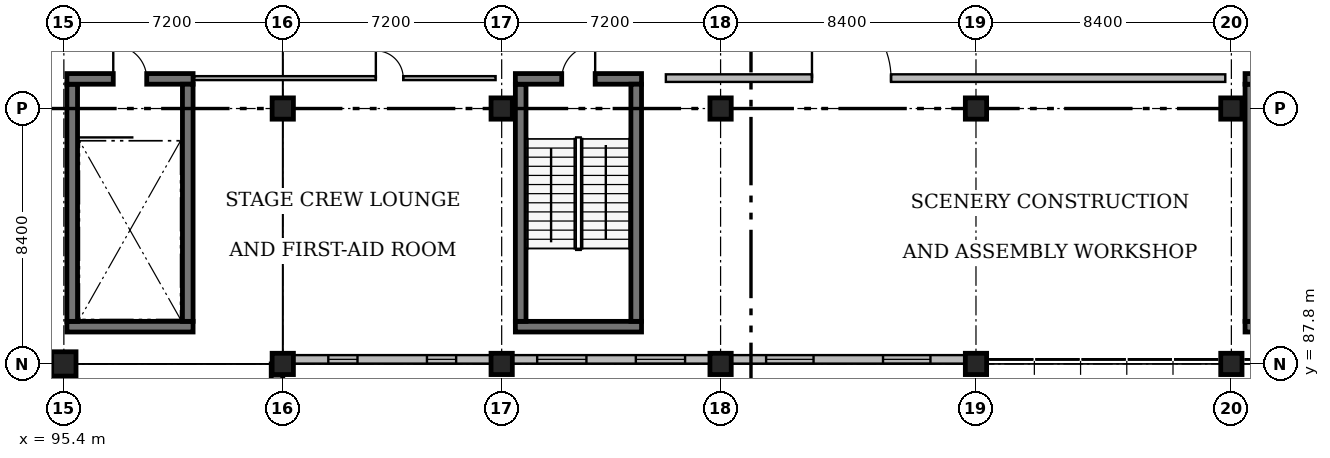
"""IFC4 building model, lengths in metres.
Left out: names, types, materials, properties, quantities, classifications, styles, units other than length and angle.
Written with IfcOpenShell. Run it as: python <this file> out.ifc"""

import sys

from ifc_helpers import new_model, si_unit, direction, frame, frame_2d, origin, origin_2d, place, context, subcontext, project, spatial, rectangle, extrude, element, fill, save


model = new_model("IFC4")
c1 = context("Model", 3, precision=1e-05, world=origin(), true_north=direction((0.0, 1.0)))
c2 = subcontext(c1, "Body", "Model", "MODEL_VIEW")
j1 = project(units=[si_unit("LENGTHUNIT", "METRE"), si_unit("PLANEANGLEUNIT", "RADIAN")], contexts=[c1])
p1 = place(None, origin())
s1 = spatial("IfcSite", under=j1, at=p1, CompositionType="ELEMENT")
p2 = place(p1, origin())
s2 = spatial("IfcBuilding", under=s1, at=p2, CompositionType="ELEMENT")
p3 = place(p2, origin())
s3 = spatial("IfcBuildingStorey", under=s2, at=p3, CompositionType="ELEMENT", Elevation=0.0)
p4 = place(p3, frame((95.4, 87.8, 0.0), z_axis=(0.0, 0.0, 1.0), x_axis=(1.0, 0.0, 0.0)))
e1 = element("IfcColumn", 1, at=p4, inside=s3, PredefinedType="COLUMN", context=c2, shape_type="SweptSolid", body=[
    extrude(rectangle(XDim=0.8, YDim=0.8, at=origin_2d()), origin(), (0.0, 0.0, 1.0), 4.8),
])
for number, where, z_axis, x_axis in (
    (2, (102.6, 87.8, 0.0), (0.0, 0.0, 1.0), (1.0, 0.0, 0.0)),
    (3, (102.6, 96.2, 0.0), (0.0, 0.0, 1.0), (1.0, 0.0, 0.0)),
    (4, (109.8, 87.8, 0.0), (0.0, 0.0, 1.0), (1.0, 0.0, 0.0)),
    (5, (109.8, 96.2, 0.0), (0.0, 0.0, 1.0), (1.0, 0.0, 0.0)),
    (6, (117.0, 87.8, 0.0), (0.0, 0.0, 1.0), (1.0, 0.0, 0.0)),
    (7, (117.0, 96.2, 0.0), (0.0, 0.0, 1.0), (1.0, 0.0, 0.0)),
    (8, (125.4, 87.8, 0.0), (0.0, 0.0, 1.0), (1.0, 0.0, 0.0)),
    (9, (125.4, 96.2, 0.0), (0.0, 0.0, 1.0), (1.0, 0.0, 0.0)),
    (10, (133.8, 87.8, 0.0), (0.0, 0.0, 1.0), (1.0, 0.0, 0.0)),
    (11, (133.8, 96.2, 0.0), (0.0, 0.0, 1.0), (1.0, 0.0, 0.0)),
):
    element("IfcColumn", number, at=place(p3, frame(where, z_axis=z_axis, x_axis=x_axis)), inside=s3, PredefinedType="COLUMN", context=c2, shape_type="SweptSolid", body=[
        extrude(rectangle(XDim=0.7, YDim=0.7, at=origin_2d()), origin(), (0.0, 0.0, 1.0), 4.8),
    ])
p5 = place(p3, frame((99.65, 89.025, 0.0), z_axis=(0.0, 0.0, 1.0), x_axis=(-1.0, 0.0, 0.0)))
e12 = element("IfcWall", 12, at=p5, inside=s3, PredefinedType="SOLIDWALL", context=c2, shape_type="SweptSolid", body=[
    extrude(rectangle(XDim=4.15, YDim=0.35, at=frame_2d((2.075, 0.0))), origin(), (0.0, 0.0, 1.0), 4.54),
])
p6 = place(p3, frame((95.675, 89.2, 0.0), z_axis=(0.0, 0.0, 1.0), x_axis=(0.0, 1.0, 0.0)))
e13 = element("IfcWall", 13, at=p6, inside=s3, PredefinedType="SOLIDWALL", context=c2, shape_type="SweptSolid", body=[
    extrude(rectangle(XDim=7.8, YDim=0.35, at=frame_2d((3.9, 0.0))), origin(), (0.0, 0.0, 1.0), 4.54),
])
p7 = place(p3, frame((95.5, 97.175, 0.0), z_axis=(0.0, 0.0, 1.0), x_axis=(1.0, 0.0, 0.0)))
e14 = element("IfcWall", 14, at=p7, inside=s3, PredefinedType="SOLIDWALL", context=c2, shape_type="SweptSolid", body=[
    extrude(rectangle(XDim=4.15, YDim=0.35, at=frame_2d((2.075, 0.0))), origin(), (0.0, 0.0, 1.0), 4.54),
])
p8 = place(p7, frame((1.525, 0.0, 0.0)))
e15 = element("IfcOpeningElement", 15, at=p8, cuts=e14, PredefinedType="OPENING", context=c2, shape_type="SweptSolid", body=[
    extrude(rectangle(XDim=1.1, YDim=2.15, at=frame_2d((0.55, 1.075))), frame((0.0, 0.195, 0.0), z_axis=(0.0, -1.0, 0.0), x_axis=(1.0, 0.0, 0.0)), (0.0, 0.0, 1.0), 0.39),
])
p9 = place(p3, frame((99.475, 97.0, 0.0), z_axis=(0.0, 0.0, 1.0), x_axis=(0.0, -1.0, 0.0)))
e16 = element("IfcWall", 16, at=p9, inside=s3, PredefinedType="SOLIDWALL", context=c2, shape_type="SweptSolid", body=[
    extrude(rectangle(XDim=7.8, YDim=0.35, at=frame_2d((3.9, 0.0))), origin(), (0.0, 0.0, 1.0), 4.54),
])
p10 = place(p3, frame((114.4, 89.025, 0.0), z_axis=(0.0, 0.0, 1.0), x_axis=(-1.0, 0.0, 0.0)))
e17 = element("IfcWall", 17, at=p10, inside=s3, PredefinedType="SOLIDWALL", context=c2, shape_type="SweptSolid", body=[
    extrude(rectangle(XDim=4.15, YDim=0.35, at=frame_2d((2.075, 0.0))), origin(), (0.0, 0.0, 1.0), 4.8),
])
p11 = place(p3, frame((110.425, 89.2, 0.0), z_axis=(0.0, 0.0, 1.0), x_axis=(0.0, 1.0, 0.0)))
e18 = element("IfcWall", 18, at=p11, inside=s3, PredefinedType="SOLIDWALL", context=c2, shape_type="SweptSolid", body=[
    extrude(rectangle(XDim=7.8, YDim=0.35, at=frame_2d((3.9, 0.0))), origin(), (0.0, 0.0, 1.0), 4.8),
])
p12 = place(p3, frame((110.25, 97.175, 0.0), z_axis=(0.0, 0.0, 1.0), x_axis=(1.0, 0.0, 0.0)))
e19 = element("IfcWall", 19, at=p12, inside=s3, PredefinedType="SOLIDWALL", context=c2, shape_type="SweptSolid", body=[
    extrude(rectangle(XDim=4.15, YDim=0.35, at=frame_2d((2.075, 0.0))), origin(), (0.0, 0.0, 1.0), 4.8),
])
p13 = place(p12, frame((1.525, 0.0, 0.0)))
e20 = element("IfcOpeningElement", 20, at=p13, cuts=e19, PredefinedType="OPENING", context=c2, shape_type="SweptSolid", body=[
    extrude(rectangle(XDim=1.1, YDim=2.15, at=frame_2d((0.55, 1.075))), frame((0.0, 0.195, 0.0), z_axis=(0.0, -1.0, 0.0), x_axis=(1.0, 0.0, 0.0)), (0.0, 0.0, 1.0), 0.39),
])
p14 = place(p3, frame((114.225, 97.0, 0.0), z_axis=(0.0, 0.0, 1.0), x_axis=(0.0, -1.0, 0.0)))
e21 = element("IfcWall", 21, at=p14, inside=s3, PredefinedType="SOLIDWALL", context=c2, shape_type="SweptSolid", body=[
    extrude(rectangle(XDim=7.8, YDim=0.35, at=frame_2d((3.9, 0.0))), origin(), (0.0, 0.0, 1.0), 4.8),
])
p15 = place(p3, frame((138.4, 89.025, 0.0), z_axis=(0.0, 0.0, 1.0), x_axis=(-1.0, 0.0, 0.0)))
e22 = element("IfcWall", 22, at=p15, inside=s3, PredefinedType="SOLIDWALL", context=c2, shape_type="SweptSolid", body=[
    extrude(rectangle(XDim=4.15, YDim=0.35, at=frame_2d((2.075, 0.0))), origin(), (0.0, 0.0, 1.0), 4.56),
])
p16 = place(p3, frame((134.425, 89.2, 0.0), z_axis=(0.0, 0.0, 1.0), x_axis=(0.0, 1.0, 0.0)))
e23 = element("IfcWall", 23, at=p16, inside=s3, PredefinedType="SOLIDWALL", context=c2, shape_type="SweptSolid", body=[
    extrude(rectangle(XDim=7.8, YDim=0.35, at=frame_2d((3.9, 0.0))), origin(), (0.0, 0.0, 1.0), 4.56),
])
p17 = place(p3, frame((134.25, 97.175, 0.0), z_axis=(0.0, 0.0, 1.0), x_axis=(1.0, 0.0, 0.0)))
e24 = element("IfcWall", 24, at=p17, inside=s3, PredefinedType="SOLIDWALL", context=c2, shape_type="SweptSolid", body=[
    extrude(rectangle(XDim=4.15, YDim=0.35, at=frame_2d((2.075, 0.0))), origin(), (0.0, 0.0, 1.0), 4.56),
])
p18 = place(p17, frame((1.525, 0.0, 0.0)))
e25 = element("IfcOpeningElement", 25, at=p18, cuts=e24, PredefinedType="OPENING", context=c2, shape_type="SweptSolid", body=[
    extrude(rectangle(XDim=1.1, YDim=2.15, at=frame_2d((0.55, 1.075))), frame((0.0, 0.195, 0.0), z_axis=(0.0, -1.0, 0.0), x_axis=(1.0, 0.0, 0.0)), (0.0, 0.0, 1.0), 0.39),
])
p19 = place(p3, frame((102.41, 87.8, 0.0), z_axis=(0.0, 0.0, 1.0), x_axis=(0.0, -1.0, 0.0)))
e26 = element("IfcWall", 26, at=p19, inside=s3, PredefinedType="SOLIDWALL", context=c2, shape_type="SweptSolid", body=[
    extrude(rectangle(XDim=36.0, YDim=0.38, at=frame_2d((18.0, 0.0))), origin(), (0.0, 0.0, 1.0), 4.54),
])
p20 = place(p19, frame((10.6, 0.0, 0.0)))
e27 = element("IfcOpeningElement", 27, at=p20, cuts=e26, PredefinedType="OPENING", context=c2, shape_type="SweptSolid", body=[
    extrude(rectangle(XDim=1.8, YDim=2.2, at=frame_2d((0.9, 1.1))), frame((0.0, 0.21, 0.0), z_axis=(0.0, -1.0, 0.0), x_axis=(1.0, 0.0, 0.0)), (0.0, 0.0, 1.0), 0.42),
])
p21 = place(p19, frame((24.8, 0.0, 0.0)))
e28 = element("IfcOpeningElement", 28, at=p21, cuts=e26, PredefinedType="OPENING", context=c2, shape_type="SweptSolid", body=[
    extrude(rectangle(XDim=1.8, YDim=2.2, at=frame_2d((0.9, 1.1))), frame((0.0, 0.21, 0.0), z_axis=(0.0, -1.0, 0.0), x_axis=(1.0, 0.0, 0.0)), (0.0, 0.0, 1.0), 0.42),
])
p22 = place(p3, frame((102.955, 87.95, 0.0), z_axis=(0.0, 0.0, 1.0), x_axis=(1.0, 0.0, 0.0)))
e29 = element("IfcWall", 29, at=p22, inside=s3, PredefinedType="SOLIDWALL", context=c2, shape_type="SweptSolid", body=[
    extrude(rectangle(XDim=6.49, YDim=0.28, at=frame_2d((3.245, 0.0))), origin(), (0.0, 0.0, 1.0), 3.873),
])
p23 = place(p22, frame((1.143, 0.0, 0.95)))
e30 = element("IfcOpeningElement", 30, at=p23, cuts=e29, PredefinedType="OPENING", context=c2, shape_type="SweptSolid", body=[
    extrude(rectangle(XDim=0.96, YDim=1.55, at=frame_2d((0.48, 0.775))), frame((0.0, 0.16, 0.0), z_axis=(0.0, -1.0, 0.0), x_axis=(1.0, 0.0, 0.0)), (0.0, 0.0, 1.0), 0.32),
])
p24 = place(p22, frame((4.387, 0.0, 0.95)))
e31 = element("IfcOpeningElement", 31, at=p24, cuts=e29, PredefinedType="OPENING", context=c2, shape_type="SweptSolid", body=[
    extrude(rectangle(XDim=0.96, YDim=1.55, at=frame_2d((0.48, 0.775))), frame((0.0, 0.16, 0.0), z_axis=(0.0, -1.0, 0.0), x_axis=(1.0, 0.0, 0.0)), (0.0, 0.0, 1.0), 0.32),
])
p25 = place(p3, frame((110.155, 87.95, 0.0), z_axis=(0.0, 0.0, 1.0), x_axis=(1.0, 0.0, 0.0)))
e32 = element("IfcWall", 32, at=p25, inside=s3, PredefinedType="SOLIDWALL", context=c2, shape_type="SweptSolid", body=[
    extrude(rectangle(XDim=6.49, YDim=0.28, at=frame_2d((3.245, 0.0))), origin(), (0.0, 0.0, 1.0), 3.873),
])
p26 = place(p25, frame((0.812, 0.0, 0.95)))
e33 = element("IfcOpeningElement", 33, at=p26, cuts=e32, PredefinedType="OPENING", context=c2, shape_type="SweptSolid", body=[
    extrude(rectangle(XDim=1.62, YDim=2.0, at=frame_2d((0.81, 1.0))), frame((0.0, 0.16, 0.0), z_axis=(0.0, -1.0, 0.0), x_axis=(1.0, 0.0, 0.0)), (0.0, 0.0, 1.0), 0.32),
])
p27 = place(p25, frame((4.058, 0.0, 0.95)))
e34 = element("IfcOpeningElement", 34, at=p27, cuts=e32, PredefinedType="OPENING", context=c2, shape_type="SweptSolid", body=[
    extrude(rectangle(XDim=1.62, YDim=2.0, at=frame_2d((0.81, 1.0))), frame((0.0, 0.16, 0.0), z_axis=(0.0, -1.0, 0.0), x_axis=(1.0, 0.0, 0.0)), (0.0, 0.0, 1.0), 0.32),
])
p28 = place(p3, frame((117.355, 87.95, 0.0), z_axis=(0.0, 0.0, 1.0), x_axis=(1.0, 0.0, 0.0)))
e35 = element("IfcWall", 35, at=p28, inside=s3, PredefinedType="SOLIDWALL", context=c2, shape_type="SweptSolid", body=[
    extrude(rectangle(XDim=7.69, YDim=0.28, at=frame_2d((3.845, 0.0))), origin(), (0.0, 0.0, 1.0), 3.873),
])
p29 = place(p28, frame((1.143, 0.0, 0.95)))
e36 = element("IfcOpeningElement", 36, at=p29, cuts=e35, PredefinedType="OPENING", context=c2, shape_type="SweptSolid", body=[
    extrude(rectangle(XDim=1.56, YDim=2.0, at=frame_2d((0.78, 1.0))), frame((0.0, 0.16, 0.0), z_axis=(0.0, -1.0, 0.0), x_axis=(1.0, 0.0, 0.0)), (0.0, 0.0, 1.0), 0.32),
])
p30 = place(p28, frame((4.988, 0.0, 0.95)))
e37 = element("IfcOpeningElement", 37, at=p30, cuts=e35, PredefinedType="OPENING", context=c2, shape_type="SweptSolid", body=[
    extrude(rectangle(XDim=1.56, YDim=2.0, at=frame_2d((0.78, 1.0))), frame((0.0, 0.16, 0.0), z_axis=(0.0, -1.0, 0.0), x_axis=(1.0, 0.0, 0.0)), (0.0, 0.0, 1.0), 0.32),
])
p31 = place(p3, frame((115.2, 97.2, 0.0), z_axis=(0.0, 0.0, 1.0), x_axis=(1.0, 0.0, 0.0)))
e38 = element("IfcWall", 38, at=p31, inside=s3, PredefinedType="PARTITIONING", context=c2, shape_type="SweptSolid", body=[
    extrude(rectangle(XDim=18.4, YDim=0.25, at=frame_2d((9.2, 0.0))), origin(), (0.0, 0.0, 1.0), 4.54),
])
p32 = place(p31, frame((4.806, 0.0, 0.0)))
e39 = element("IfcOpeningElement", 39, at=p32, cuts=e38, PredefinedType="OPENING", context=c2, shape_type="SweptSolid", body=[
    extrude(rectangle(XDim=2.6, YDim=3.2, at=frame_2d((1.3, 1.6))), frame((0.0, 0.145, 0.0), z_axis=(0.0, -1.0, 0.0), x_axis=(1.0, 0.0, 0.0)), (0.0, 0.0, 1.0), 0.29),
])
p33 = place(p3, frame((99.69, 97.2, 0.0), z_axis=(0.0, 0.0, 1.0), x_axis=(1.0, 0.0, 0.0)))
e40 = element("IfcWall", 40, at=p33, inside=s3, PredefinedType="PARTITIONING", context=c2, shape_type="SweptSolid", body=[
    extrude(rectangle(XDim=9.91, YDim=0.13, at=frame_2d((4.955, 0.0))), origin(), (0.0, 0.0, 1.0), 4.54),
])
p34 = place(p33, frame((5.971, 0.0, 0.0)))
e41 = element("IfcOpeningElement", 41, at=p34, cuts=e40, PredefinedType="OPENING", context=c2, shape_type="SweptSolid", body=[
    extrude(rectangle(XDim=0.9, YDim=2.15, at=frame_2d((0.45, 1.075))), frame((0.0, 0.085, 0.0), z_axis=(0.0, -1.0, 0.0), x_axis=(1.0, 0.0, 0.0)), (0.0, 0.0, 1.0), 0.17),
])
p35 = place(p8, origin())
e42 = element("IfcDoor", 42, at=p35, inside=s3, OperationType="SINGLE_SWING_LEFT", PredefinedType="DOOR", context=c2, shape_type="SweptSolid", body=[
    extrude(rectangle(XDim=1.1, YDim=2.15, at=frame_2d((0.55, 1.075))), frame((0.0, 0.025, 0.0), z_axis=(0.0, -1.0, 0.0), x_axis=(1.0, 0.0, 0.0)), (0.0, 0.0, 1.0), 0.05),
])
fill(e15, e42)
p36 = place(p13, origin())
e43 = element("IfcDoor", 43, at=p36, inside=s3, OperationType="SINGLE_SWING_RIGHT", PredefinedType="DOOR", context=c2, shape_type="SweptSolid", body=[
    extrude(rectangle(XDim=1.1, YDim=2.15, at=frame_2d((0.55, 1.075))), frame((0.0, 0.025, 0.0), z_axis=(0.0, -1.0, 0.0), x_axis=(1.0, 0.0, 0.0)), (0.0, 0.0, 1.0), 0.05),
])
fill(e20, e43)
p37 = place(p23, origin())
e44 = element("IfcWindow", 44, at=p37, inside=s3, PartitioningType="SINGLE_PANEL", PredefinedType="WINDOW", context=c2, shape_type="SweptSolid", body=[
    extrude(rectangle(XDim=0.96, YDim=1.55, at=frame_2d((0.48, 0.775))), frame((0.0, 0.03, 0.0), z_axis=(0.0, -1.0, 0.0), x_axis=(1.0, 0.0, 0.0)), (0.0, 0.0, 1.0), 0.06),
])
fill(e30, e44)
p38 = place(p24, origin())
e45 = element("IfcWindow", 45, at=p38, inside=s3, PartitioningType="SINGLE_PANEL", PredefinedType="WINDOW", context=c2, shape_type="SweptSolid", body=[
    extrude(rectangle(XDim=0.96, YDim=1.55, at=frame_2d((0.48, 0.775))), frame((0.0, 0.03, 0.0), z_axis=(0.0, -1.0, 0.0), x_axis=(1.0, 0.0, 0.0)), (0.0, 0.0, 1.0), 0.06),
])
fill(e31, e45)
p39 = place(p26, origin())
e46 = element("IfcWindow", 46, at=p39, inside=s3, PartitioningType="SINGLE_PANEL", PredefinedType="WINDOW", context=c2, shape_type="SweptSolid", body=[
    extrude(rectangle(XDim=1.62, YDim=2.0, at=frame_2d((0.81, 1.0))), frame((0.0, 0.03, 0.0), z_axis=(0.0, -1.0, 0.0), x_axis=(1.0, 0.0, 0.0)), (0.0, 0.0, 1.0), 0.06),
])
fill(e33, e46)
p40 = place(p27, origin())
e47 = element("IfcWindow", 47, at=p40, inside=s3, PartitioningType="SINGLE_PANEL", PredefinedType="WINDOW", context=c2, shape_type="SweptSolid", body=[
    extrude(rectangle(XDim=1.62, YDim=2.0, at=frame_2d((0.81, 1.0))), frame((0.0, 0.03, 0.0), z_axis=(0.0, -1.0, 0.0), x_axis=(1.0, 0.0, 0.0)), (0.0, 0.0, 1.0), 0.06),
])
fill(e34, e47)
p41 = place(p29, origin())
e48 = element("IfcWindow", 48, at=p41, inside=s3, PartitioningType="SINGLE_PANEL", PredefinedType="WINDOW", context=c2, shape_type="SweptSolid", body=[
    extrude(rectangle(XDim=1.56, YDim=2.0, at=frame_2d((0.78, 1.0))), frame((0.0, 0.03, 0.0), z_axis=(0.0, -1.0, 0.0), x_axis=(1.0, 0.0, 0.0)), (0.0, 0.0, 1.0), 0.06),
])
fill(e36, e48)
p42 = place(p30, origin())
e49 = element("IfcWindow", 49, at=p42, inside=s3, PartitioningType="SINGLE_PANEL", PredefinedType="WINDOW", context=c2, shape_type="SweptSolid", body=[
    extrude(rectangle(XDim=1.56, YDim=2.0, at=frame_2d((0.78, 1.0))), frame((0.0, 0.03, 0.0), z_axis=(0.0, -1.0, 0.0), x_axis=(1.0, 0.0, 0.0)), (0.0, 0.0, 1.0), 0.06),
])
fill(e37, e49)
p43 = place(p32, origin())
e50 = element("IfcDoor", 50, at=p43, inside=s3, OperationType="DOUBLE_DOOR_SINGLE_SWING", PredefinedType="DOOR", context=c2, shape_type="SweptSolid", body=[
    extrude(rectangle(XDim=2.6, YDim=3.2, at=frame_2d((1.3, 1.6))), frame((0.0, 0.025, 0.0), z_axis=(0.0, -1.0, 0.0), x_axis=(1.0, 0.0, 0.0)), (0.0, 0.0, 1.0), 0.05),
])
fill(e39, e50)
p44 = place(p34, origin())
e51 = element("IfcDoor", 51, at=p44, inside=s3, OperationType="SINGLE_SWING_LEFT", PredefinedType="DOOR", context=c2, shape_type="SweptSolid", body=[
    extrude(rectangle(XDim=0.9, YDim=2.15, at=frame_2d((0.45, 1.075))), frame((0.0, 0.025, 0.0), z_axis=(0.0, -1.0, 0.0), x_axis=(1.0, 0.0, 0.0)), (0.0, 0.0, 1.0), 0.05),
])
fill(e41, e51)
save(model, sys.argv[1])
